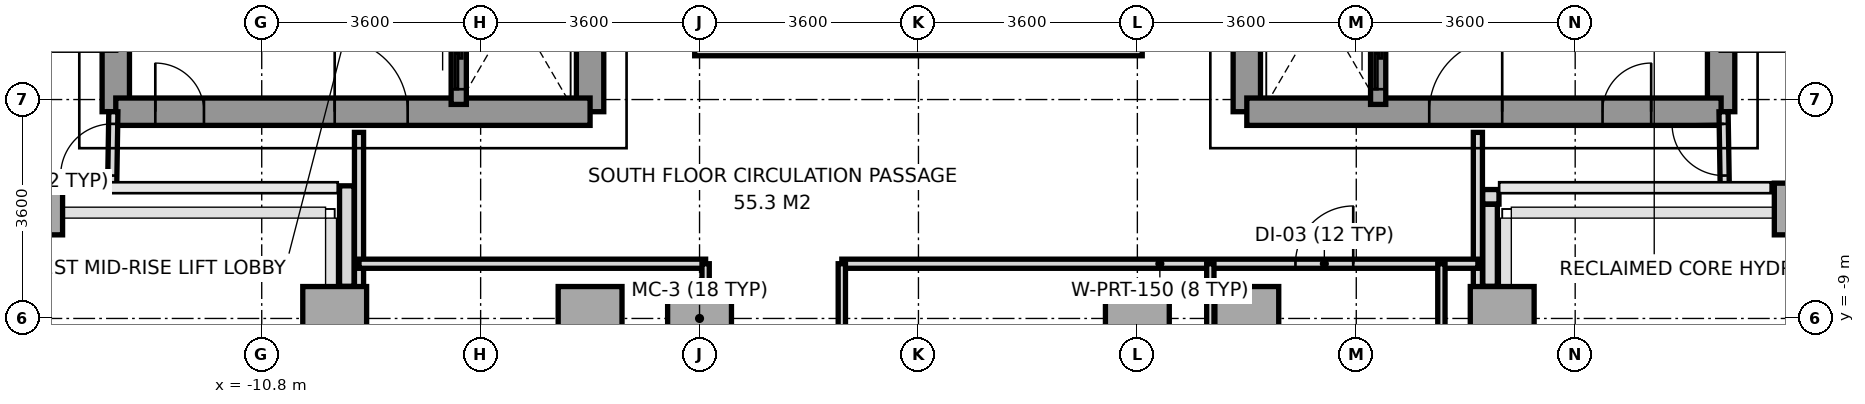
"""IFC4 building model, lengths in metres.
Left out: names, types, materials, properties, quantities, classifications, styles, units other than length and angle.
Written with IfcOpenShell. Run it as: python <this file> out.ifc"""

import sys

from ifc_helpers import new_model, si_unit, direction, frame, frame_2d, origin, origin_2d, place, context, subcontext, project, spatial, rectangle, extrude, source, transform, mapped, element, fill, save


model = new_model("IFC4")
c1 = context("Model", 3, precision=1e-05, world=origin(), true_north=direction((0.0, 1.0)))
c2 = subcontext(c1, "Body", "Model", "MODEL_VIEW")
j1 = project(units=[si_unit("LENGTHUNIT", "METRE"), si_unit("PLANEANGLEUNIT", "RADIAN")], contexts=[c1])
p1 = place(None, origin())
s1 = spatial("IfcSite", under=j1, at=p1, CompositionType="ELEMENT")
p2 = place(p1, origin())
s2 = spatial("IfcBuilding", under=s1, at=p2, CompositionType="ELEMENT")
p3 = place(p2, frame((0.0, 0.0, 114.2)))
s3 = spatial("IfcBuildingStorey", under=s2, at=p3, CompositionType="ELEMENT", Elevation=114.2)
m1 = source(origin(), c2, "Body", "SweptSolid", [
    extrude(rectangle(XDim=0.65, YDim=0.85, at=origin_2d()), origin(), (0.0, 0.0, 1.0), 3.2),
])
p4 = place(p3, frame((-14.4, -7.2, 0.0), z_axis=(0.0, 0.0, 1.0), x_axis=(1.0, 0.0, 0.0)))
e1 = element("IfcColumn", 1, at=p4, inside=s3, PredefinedType="COLUMN", context=c2, shape_type="MappedRepresentation", body=[
    mapped(m1, transform((0.0, 0.0, 0.0), x_axis=(1.0, 0.0, 0.0), y_axis=(0.0, 1.0, 0.0), z_axis=(0.0, 0.0, 1.0), scale=1.0)),
])
m2 = source(origin(), c2, "Body", "SweptSolid", [
    extrude(rectangle(XDim=1.05, YDim=1.05, at=origin_2d()), origin(), (0.0, 0.0, 1.0), 3.2),
])
for number, where, z_axis, x_axis in (
    (2, (-9.6, -9.0, 0.0), (0.0, 0.0, 1.0), (1.0, 0.0, 0.0)),
    (3, (-5.4, -9.0, 0.0), (0.0, 0.0, 1.0), (1.0, 0.0, 0.0)),
    (4, (-3.6, -9.0, 0.0), (0.0, 0.0, 1.0), (1.0, 0.0, 0.0)),
    (5, (3.6, -9.0, 0.0), (0.0, 0.0, 1.0), (1.0, 0.0, 0.0)),
    (6, (5.4, -9.0, 0.0), (0.0, 0.0, 1.0), (1.0, 0.0, 0.0)),
    (7, (9.6, -9.0, 0.0), (0.0, 0.0, 1.0), (1.0, 0.0, 0.0)),
):
    element("IfcColumn", number, at=place(p3, frame(where, z_axis=z_axis, x_axis=x_axis)), inside=s3, PredefinedType="COLUMN", context=c2, shape_type="MappedRepresentation", body=[
        mapped(m2, transform((0.0, 0.0, 0.0), x_axis=(1.0, 0.0, 0.0), y_axis=(0.0, 1.0, 0.0), z_axis=(0.0, 0.0, 1.0), scale=1.0)),
    ])
p5 = place(p3, frame((14.4, -7.2, 0.0), z_axis=(0.0, 0.0, 1.0), x_axis=(1.0, 0.0, 0.0)))
e8 = element("IfcColumn", 8, at=p5, inside=s3, PredefinedType="COLUMN", context=c2, shape_type="MappedRepresentation", body=[
    mapped(m1, transform((0.0, 0.0, 0.0), x_axis=(1.0, 0.0, 0.0), y_axis=(0.0, 1.0, 0.0), z_axis=(0.0, 0.0, 1.0), scale=1.0)),
])
p6 = place(p3, frame((9.547, -7.0, 0.0), z_axis=(0.0, 0.0, 1.0), x_axis=(-1.0, 0.0, 0.0)))
e9 = element("IfcWall", 9, at=p6, inside=s3, PredefinedType="PARAPET", context=c2, shape_type="SweptSolid", body=[
    extrude(rectangle(XDim=0.269, YDim=0.24, at=frame_2d((0.135, 0.0))), origin(), (0.0, 0.0, 1.0), 1.15),
])
p7 = place(p3, frame((9.4, -7.123, 0.0), z_axis=(0.0, 0.0, 1.0), x_axis=(0.0, -1.0, 0.0)))
e10 = element("IfcWall", 10, at=p7, inside=s3, PredefinedType="PARAPET", context=c2, shape_type="SweptSolid", body=[
    extrude(rectangle(XDim=1.349, YDim=0.24, at=frame_2d((0.674, 0.0))), origin(), (0.0, 0.0, 1.0), 1.15),
])
p8 = place(p3, frame((-9.4, -8.472, 0.0), z_axis=(0.0, 0.0, 1.0), x_axis=(0.0, 1.0, 0.0)))
e11 = element("IfcWall", 11, at=p8, inside=s3, PredefinedType="PARAPET", context=c2, shape_type="SweptSolid", body=[
    extrude(rectangle(XDim=1.653, YDim=0.24, at=frame_2d((0.827, 0.0))), origin(), (0.0, 0.0, 1.0), 1.15),
])
p9 = place(p3, frame((-13.2, -5.6, 0.0), z_axis=(0.0, 0.0, 1.0), x_axis=(0.0, 1.0, 0.0)))
e12 = element("IfcWall", 12, at=p9, inside=s3, PredefinedType="SHEAR", context=c2, shape_type="SweptSolid", body=[
    extrude(rectangle(XDim=11.2, YDim=0.45, at=frame_2d((5.6, 0.0))), origin(), (0.0, 0.0, 1.0), 3.2),
])
p10 = place(p3, frame((-5.4, -5.6, 0.0), z_axis=(0.0, 0.0, 1.0), x_axis=(0.0, 1.0, 0.0)))
e13 = element("IfcWall", 13, at=p10, inside=s3, PredefinedType="SHEAR", context=c2, shape_type="SweptSolid", body=[
    extrude(rectangle(XDim=12.5, YDim=0.45, at=frame_2d((6.25, 0.0))), origin(), (0.0, 0.0, 1.0), 3.2),
])
p11 = place(p10, frame((4.55, 0.0, 0.0)))
e14 = element("IfcOpeningElement", 14, at=p11, cuts=e13, PredefinedType="OPENING", context=c2, shape_type="SweptSolid", body=[
    extrude(rectangle(XDim=1.2, YDim=2.2, at=frame_2d((0.6, 1.1))), frame((0.0, 0.235, 0.0), z_axis=(0.0, -1.0, 0.0), x_axis=(1.0, 0.0, 0.0)), (0.0, 0.0, 1.0), 0.47),
])
p12 = place(p10, frame((6.86, 0.0, 0.0)))
e15 = element("IfcOpeningElement", 15, at=p12, cuts=e13, PredefinedType="OPENING", context=c2, shape_type="SweptSolid", body=[
    extrude(rectangle(XDim=0.8, YDim=2.1, at=frame_2d((0.4, 1.05))), frame((0.0, 0.235, 0.0), z_axis=(0.0, -1.0, 0.0), x_axis=(1.0, 0.0, 0.0)), (0.0, 0.0, 1.0), 0.47),
])
p13 = place(p10, frame((7.88, 0.0, 0.0)))
e16 = element("IfcOpeningElement", 16, at=p13, cuts=e13, PredefinedType="OPENING", context=c2, shape_type="SweptSolid", body=[
    extrude(rectangle(XDim=0.8, YDim=2.1, at=frame_2d((0.4, 1.05))), frame((0.0, 0.235, 0.0), z_axis=(0.0, -1.0, 0.0), x_axis=(1.0, 0.0, 0.0)), (0.0, 0.0, 1.0), 0.47),
])
p14 = place(p3, frame((-13.2, -5.6, 0.0), z_axis=(0.0, 0.0, 1.0), x_axis=(1.0, 0.0, 0.0)))
e17 = element("IfcWall", 17, at=p14, inside=s3, PredefinedType="SHEAR", context=c2, shape_type="SweptSolid", body=[
    extrude(rectangle(XDim=7.8, YDim=0.45, at=frame_2d((3.9, 0.0))), origin(), (0.0, 0.0, 1.0), 3.2),
])
p15 = place(p14, frame((3.6, 0.0, 0.0)))
e18 = element("IfcOpeningElement", 18, at=p15, cuts=e17, PredefinedType="OPENING", context=c2, shape_type="SweptSolid", body=[
    extrude(rectangle(XDim=1.2, YDim=2.2, at=frame_2d((0.6, 1.1))), frame((0.0, 0.235, 0.0), z_axis=(0.0, -1.0, 0.0), x_axis=(1.0, 0.0, 0.0)), (0.0, 0.0, 1.0), 0.47),
])
p16 = place(p14, frame((0.65, 0.0, 0.0)))
e19 = element("IfcOpeningElement", 19, at=p16, cuts=e17, PredefinedType="OPENING", context=c2, shape_type="SweptSolid", body=[
    extrude(rectangle(XDim=0.8, YDim=2.1, at=frame_2d((0.4, 1.05))), frame((0.0, 0.235, 0.0), z_axis=(0.0, -1.0, 0.0), x_axis=(1.0, 0.0, 0.0)), (0.0, 0.0, 1.0), 0.47),
])
p17 = place(p3, frame((13.2, -5.6, 0.0), z_axis=(0.0, 0.0, 1.0), x_axis=(0.0, 1.0, 0.0)))
e20 = element("IfcWall", 20, at=p17, inside=s3, PredefinedType="SHEAR", context=c2, shape_type="SweptSolid", body=[
    extrude(rectangle(XDim=11.2, YDim=0.45, at=frame_2d((5.6, 0.0))), origin(), (0.0, 0.0, 1.0), 3.2),
])
p18 = place(p3, frame((5.4, -5.6, 0.0), z_axis=(0.0, 0.0, 1.0), x_axis=(0.0, 1.0, 0.0)))
e21 = element("IfcWall", 21, at=p18, inside=s3, PredefinedType="SHEAR", context=c2, shape_type="SweptSolid", body=[
    extrude(rectangle(XDim=12.5, YDim=0.45, at=frame_2d((6.25, 0.0))), origin(), (0.0, 0.0, 1.0), 3.2),
])
p19 = place(p18, frame((4.55, 0.0, 0.0)))
e22 = element("IfcOpeningElement", 22, at=p19, cuts=e21, PredefinedType="OPENING", context=c2, shape_type="SweptSolid", body=[
    extrude(rectangle(XDim=1.2, YDim=2.2, at=frame_2d((0.6, 1.1))), frame((0.0, 0.235, 0.0), z_axis=(0.0, -1.0, 0.0), x_axis=(1.0, 0.0, 0.0)), (0.0, 0.0, 1.0), 0.47),
])
p20 = place(p3, frame((5.4, -5.6, 0.0), z_axis=(0.0, 0.0, 1.0), x_axis=(1.0, 0.0, 0.0)))
e23 = element("IfcWall", 23, at=p20, inside=s3, PredefinedType="SHEAR", context=c2, shape_type="SweptSolid", body=[
    extrude(rectangle(XDim=7.8, YDim=0.45, at=frame_2d((3.9, 0.0))), origin(), (0.0, 0.0, 1.0), 3.2),
])
p21 = place(p20, frame((3.0, 0.0, 0.0)))
e24 = element("IfcOpeningElement", 24, at=p21, cuts=e23, PredefinedType="OPENING", context=c2, shape_type="SweptSolid", body=[
    extrude(rectangle(XDim=1.2, YDim=2.2, at=frame_2d((0.6, 1.1))), frame((0.0, 0.235, 0.0), z_axis=(0.0, -1.0, 0.0), x_axis=(1.0, 0.0, 0.0)), (0.0, 0.0, 1.0), 0.47),
])
p22 = place(p20, frame((5.85, 0.0, 0.0)))
e25 = element("IfcOpeningElement", 25, at=p22, cuts=e23, PredefinedType="OPENING", context=c2, shape_type="SweptSolid", body=[
    extrude(rectangle(XDim=0.8, YDim=2.1, at=frame_2d((0.4, 1.05))), frame((0.0, 0.235, 0.0), z_axis=(0.0, -1.0, 0.0), x_axis=(1.0, 0.0, 0.0)), (0.0, 0.0, 1.0), 0.47),
])
p23 = place(p3, frame((-7.56, -5.48, 0.0), z_axis=(0.0, 0.0, 1.0), x_axis=(0.0, 1.0, 0.0)))
e26 = element("IfcWall", 26, at=p23, inside=s3, PredefinedType="SOLIDWALL", context=c2, shape_type="SweptSolid", body=[
    extrude(rectangle(XDim=1.6, YDim=0.25, at=frame_2d((0.8, 0.0))), origin(), (0.0, 0.0, 1.0), 3.2),
])
p24 = place(p23, frame((0.25, 0.0, 0.0)))
e27 = element("IfcOpeningElement", 27, at=p24, cuts=e26, PredefinedType="OPENING", context=c2, shape_type="SweptSolid", body=[
    extrude(rectangle(XDim=1.1, YDim=2.2, at=frame_2d((0.55, 1.1))), frame((0.0, 0.135, 0.0), z_axis=(0.0, -1.0, 0.0), x_axis=(1.0, 0.0, 0.0)), (0.0, 0.0, 1.0), 0.27),
])
p25 = place(p3, frame((7.56, -5.48, 0.0), z_axis=(0.0, 0.0, 1.0), x_axis=(0.0, 1.0, 0.0)))
e28 = element("IfcWall", 28, at=p25, inside=s3, PredefinedType="SOLIDWALL", context=c2, shape_type="SweptSolid", body=[
    extrude(rectangle(XDim=1.6, YDim=0.25, at=frame_2d((0.8, 0.0))), origin(), (0.0, 0.0, 1.0), 3.2),
])
p26 = place(p25, frame((0.25, 0.0, 0.0)))
e29 = element("IfcOpeningElement", 29, at=p26, cuts=e28, PredefinedType="OPENING", context=c2, shape_type="SweptSolid", body=[
    extrude(rectangle(XDim=1.1, YDim=2.2, at=frame_2d((0.55, 1.1))), frame((0.0, 0.135, 0.0), z_axis=(0.0, -1.0, 0.0), x_axis=(1.0, 0.0, 0.0)), (0.0, 0.0, 1.0), 0.27),
])
for number, where, z_axis, x_axis in (
    (30, (-9.2, -15.68, 0.0), (0.0, 0.0, 1.0), (0.0, 1.0, 0.0)),
    (31, (9.2, -15.68, 0.0), (0.0, 0.0, 1.0), (0.0, 1.0, 0.0)),
):
    element("IfcWall", number, at=place(p3, frame(where, z_axis=z_axis, x_axis=x_axis)), inside=s3, PredefinedType="PARTITIONING", context=c2, shape_type="SweptSolid", body=[
        extrude(rectangle(XDim=9.74, YDim=0.15, at=frame_2d((4.87, 0.0))), origin(), (0.0, 0.0, 1.0), 2.7),
    ])
p27 = place(p3, frame((-9.2, -8.1, 0.0), z_axis=(0.0, 0.0, 1.0), x_axis=(1.0, 0.0, 0.0)))
e32 = element("IfcWall", 32, at=p27, inside=s3, PredefinedType="PARTITIONING", context=c2, shape_type="SweptSolid", body=[
    extrude(rectangle(XDim=5.7, YDim=0.15, at=frame_2d((2.85, 0.0))), origin(), (0.0, 0.0, 1.0), 2.75),
])
p28 = place(p3, frame((-1.26, -8.1, 0.0), z_axis=(0.0, 0.0, 1.0), x_axis=(1.0, 0.0, 0.0)))
e33 = element("IfcWall", 33, at=p28, inside=s3, PredefinedType="PARTITIONING", context=c2, shape_type="SweptSolid", body=[
    extrude(rectangle(XDim=10.46, YDim=0.15, at=frame_2d((5.23, 0.0))), origin(), (0.0, 0.0, 1.0), 2.75),
])
p29 = place(p28, frame((7.46, 0.0, 0.0)))
e34 = element("IfcOpeningElement", 34, at=p29, cuts=e33, PredefinedType="OPENING", context=c2, shape_type="SweptSolid", body=[
    extrude(rectangle(XDim=0.95, YDim=2.15, at=frame_2d((0.475, 1.075))), frame((0.0, 0.085, 0.0), z_axis=(0.0, -1.0, 0.0), x_axis=(1.0, 0.0, 0.0)), (0.0, 0.0, 1.0), 0.17),
])
p30 = place(p3, frame((-3.5, -18.1, 0.0), z_axis=(0.0, 0.0, 1.0), x_axis=(0.0, 1.0, 0.0)))
e35 = element("IfcWall", 35, at=p30, inside=s3, PredefinedType="PARTITIONING", context=c2, shape_type="SweptSolid", body=[
    extrude(rectangle(XDim=10.0, YDim=0.12, at=frame_2d((5.0, 0.0))), origin(), (0.0, 0.0, 1.0), 2.7),
])
p31 = place(p30, frame((5.9, 0.0, 0.0)))
e36 = element("IfcOpeningElement", 36, at=p31, cuts=e35, PredefinedType="OPENING", context=c2, shape_type="SweptSolid", body=[
    extrude(rectangle(XDim=0.95, YDim=2.15, at=frame_2d((0.475, 1.075))), frame((0.0, 0.07, 0.0), z_axis=(0.0, -1.0, 0.0), x_axis=(1.0, 0.0, 0.0)), (0.0, 0.0, 1.0), 0.14),
])
p32 = place(p30, frame((1.2, 0.0, 0.0)))
e37 = element("IfcOpeningElement", 37, at=p32, cuts=e35, PredefinedType="OPENING", context=c2, shape_type="SweptSolid", body=[
    extrude(rectangle(XDim=0.95, YDim=2.15, at=frame_2d((0.475, 1.075))), frame((0.0, 0.07, 0.0), z_axis=(0.0, -1.0, 0.0), x_axis=(1.0, 0.0, 0.0)), (0.0, 0.0, 1.0), 0.14),
])
p33 = place(p3, frame((-1.26, -18.1, 0.0), z_axis=(0.0, 0.0, 1.0), x_axis=(0.0, 1.0, 0.0)))
e38 = element("IfcWall", 38, at=p33, inside=s3, PredefinedType="PARTITIONING", context=c2, shape_type="SweptSolid", body=[
    extrude(rectangle(XDim=10.0, YDim=0.12, at=frame_2d((5.0, 0.0))), origin(), (0.0, 0.0, 1.0), 2.7),
])
p34 = place(p33, frame((1.6, 0.0, 0.0)))
e39 = element("IfcOpeningElement", 39, at=p34, cuts=e38, PredefinedType="OPENING", context=c2, shape_type="SweptSolid", body=[
    extrude(rectangle(XDim=1.1, YDim=2.2, at=frame_2d((0.55, 1.1))), frame((0.0, 0.07, 0.0), z_axis=(0.0, -1.0, 0.0), x_axis=(1.0, 0.0, 0.0)), (0.0, 0.0, 1.0), 0.14),
])
p35 = place(p3, frame((4.8, -11.5, 0.0), z_axis=(0.0, 0.0, 1.0), x_axis=(0.0, 1.0, 0.0)))
e40 = element("IfcWall", 40, at=p35, inside=s3, PredefinedType="PARTITIONING", context=c2, shape_type="SweptSolid", body=[
    extrude(rectangle(XDim=3.4, YDim=0.12, at=frame_2d((1.7, 0.0))), origin(), (0.0, 0.0, 1.0), 3.2),
])
p36 = place(p3, frame((8.6, -11.5, 0.0), z_axis=(0.0, 0.0, 1.0), x_axis=(0.0, 1.0, 0.0)))
e41 = element("IfcWall", 41, at=p36, inside=s3, PredefinedType="PARTITIONING", context=c2, shape_type="SweptSolid", body=[
    extrude(rectangle(XDim=3.4, YDim=0.12, at=frame_2d((1.7, 0.0))), origin(), (0.0, 0.0, 1.0), 2.7),
])
p37 = place(p3, frame((-13.26, -6.85, 0.0), z_axis=(0.0, 0.0, 1.0), x_axis=(0.016013571389, 0.999871774545, 0.0)))
e42 = element("IfcWall", 42, at=p37, inside=s3, PredefinedType="PARTITIONING", context=c2, shape_type="SweptSolid", body=[
    extrude(rectangle(XDim=1.25, YDim=0.15, at=frame_2d((0.625, 0.0))), origin(), (0.0, 0.0, 1.0), 3.2),
])
p38 = place(p37, frame((0.2, 0.0, 0.0)))
e43 = element("IfcOpeningElement", 43, at=p38, cuts=e42, PredefinedType="OPENING", context=c2, shape_type="SweptSolid", body=[
    extrude(rectangle(XDim=0.85, YDim=2.1, at=frame_2d((0.425, 1.05))), frame((0.0, 0.085, 0.0), z_axis=(0.0, -1.0, 0.0), x_axis=(1.0, 0.0, 0.0)), (0.0, 0.0, 1.0), 0.17),
])
p39 = place(p3, frame((13.26, -6.85, 0.0), z_axis=(0.0, 0.0, 1.0), x_axis=(-0.016013571389, 0.999871774545, 0.0)))
e44 = element("IfcWall", 44, at=p39, inside=s3, PredefinedType="PARTITIONING", context=c2, shape_type="SweptSolid", body=[
    extrude(rectangle(XDim=1.25, YDim=0.15, at=frame_2d((0.625, 0.0))), origin(), (0.0, 0.0, 1.0), 3.2),
])
p40 = place(p39, frame((0.2, 0.0, 0.0)))
e45 = element("IfcOpeningElement", 45, at=p40, cuts=e44, PredefinedType="OPENING", context=c2, shape_type="SweptSolid", body=[
    extrude(rectangle(XDim=0.85, YDim=2.1, at=frame_2d((0.425, 1.05))), frame((0.0, 0.085, 0.0), z_axis=(0.0, -1.0, 0.0), x_axis=(1.0, 0.0, 0.0)), (0.0, 0.0, 1.0), 0.17),
])
p41 = place(p3, frame((-3.68, -4.56, 0.0), z_axis=(0.0, 0.0, 1.0), x_axis=(1.0, 0.0, 0.0)))
e46 = element("IfcWall", 46, at=p41, inside=s3, PredefinedType="PARAPET", context=c2, shape_type="SweptSolid", body=[
    extrude(rectangle(XDim=7.36, YDim=0.24, at=frame_2d((3.68, 0.0))), origin(), (0.0, 0.0, 1.0), 1.15),
])
m3 = source(origin(), c2, "Body", "SweptSolid", [
    extrude(rectangle(XDim=1.2, YDim=2.2, at=frame_2d((0.6, 1.1))), frame((0.0, 0.025, 0.0), z_axis=(0.0, -1.0, 0.0), x_axis=(1.0, 0.0, 0.0)), (0.0, 0.0, 1.0), 0.05),
])
p42 = place(p15, origin())
e47 = element("IfcDoor", 47, at=p42, inside=s3, OperationType="SINGLE_SWING_LEFT", PredefinedType="DOOR", context=c2, shape_type="MappedRepresentation", body=[
    mapped(m3, transform((0.0, 0.0, 0.0), x_axis=(1.0, 0.0, 0.0), y_axis=(0.0, 1.0, 0.0), z_axis=(0.0, 0.0, 1.0), scale=1.0)),
])
fill(e18, e47)
p43 = place(p21, origin())
e48 = element("IfcDoor", 48, at=p43, inside=s3, OperationType="SINGLE_SWING_RIGHT", PredefinedType="DOOR", context=c2, shape_type="MappedRepresentation", body=[
    mapped(m3, transform((0.0, 0.0, 0.0), x_axis=(1.0, 0.0, 0.0), y_axis=(0.0, 1.0, 0.0), z_axis=(0.0, 0.0, 1.0), scale=1.0)),
])
fill(e24, e48)
m4 = source(origin(), c2, "Body", "SweptSolid", [
    extrude(rectangle(XDim=0.8, YDim=2.1, at=frame_2d((0.4, 1.05))), frame((0.0, 0.025, 0.0), z_axis=(0.0, -1.0, 0.0), x_axis=(1.0, 0.0, 0.0)), (0.0, 0.0, 1.0), 0.05),
])
p44 = place(p16, origin())
e49 = element("IfcDoor", 49, at=p44, inside=s3, OperationType="SINGLE_SWING_LEFT", PredefinedType="DOOR", context=c2, shape_type="MappedRepresentation", body=[
    mapped(m4, transform((0.0, 0.0, 0.0), x_axis=(1.0, 0.0, 0.0), y_axis=(0.0, 1.0, 0.0), z_axis=(0.0, 0.0, 1.0), scale=1.0)),
])
fill(e19, e49)
p45 = place(p22, origin())
e50 = element("IfcDoor", 50, at=p45, inside=s3, OperationType="SINGLE_SWING_RIGHT", PredefinedType="DOOR", context=c2, shape_type="MappedRepresentation", body=[
    mapped(m4, transform((0.0, 0.0, 0.0), x_axis=(1.0, 0.0, 0.0), y_axis=(0.0, 1.0, 0.0), z_axis=(0.0, 0.0, 1.0), scale=1.0)),
])
fill(e25, e50)
m5 = source(origin(), c2, "Body", "SweptSolid", [
    extrude(rectangle(XDim=1.1, YDim=2.2, at=frame_2d((0.55, 1.1))), frame((0.0, 0.025, 0.0), z_axis=(0.0, -1.0, 0.0), x_axis=(1.0, 0.0, 0.0)), (0.0, 0.0, 1.0), 0.05),
])
p46 = place(p24, origin())
e51 = element("IfcDoor", 51, at=p46, inside=s3, OperationType="SLIDING_TO_LEFT", PredefinedType="DOOR", context=c2, shape_type="MappedRepresentation", body=[
    mapped(m5, transform((0.0, 0.0, 0.0), x_axis=(1.0, 0.0, 0.0), y_axis=(0.0, 1.0, 0.0), z_axis=(0.0, 0.0, 1.0), scale=1.0)),
])
fill(e27, e51)
p47 = place(p26, origin())
e52 = element("IfcDoor", 52, at=p47, inside=s3, OperationType="SLIDING_TO_LEFT", PredefinedType="DOOR", context=c2, shape_type="MappedRepresentation", body=[
    mapped(m5, transform((0.0, 0.0, 0.0), x_axis=(1.0, 0.0, 0.0), y_axis=(0.0, 1.0, 0.0), z_axis=(0.0, 0.0, 1.0), scale=1.0)),
])
fill(e29, e52)
m6 = source(origin(), c2, "Body", "SweptSolid", [
    extrude(rectangle(XDim=0.95, YDim=2.15, at=frame_2d((0.475, 1.075))), frame((0.0, 0.025, 0.0), z_axis=(0.0, -1.0, 0.0), x_axis=(1.0, 0.0, 0.0)), (0.0, 0.0, 1.0), 0.05),
])
p48 = place(p29, origin())
e53 = element("IfcDoor", 53, at=p48, inside=s3, OperationType="SINGLE_SWING_RIGHT", PredefinedType="DOOR", context=c2, shape_type="MappedRepresentation", body=[
    mapped(m6, transform((0.0, 0.0, 0.0), x_axis=(1.0, 0.0, 0.0), y_axis=(0.0, 1.0, 0.0), z_axis=(0.0, 0.0, 1.0), scale=1.0)),
])
fill(e34, e53)
m7 = source(origin(), c2, "Body", "SweptSolid", [
    extrude(rectangle(XDim=0.85, YDim=2.1, at=frame_2d((0.425, 1.05))), frame((0.0, 0.025, 0.0), z_axis=(0.0, -1.0, 0.0), x_axis=(1.0, 0.0, 0.0)), (0.0, 0.0, 1.0), 0.05),
])
p49 = place(p38, origin())
e54 = element("IfcDoor", 54, at=p49, inside=s3, OperationType="SINGLE_SWING_LEFT", PredefinedType="DOOR", context=c2, shape_type="MappedRepresentation", body=[
    mapped(m7, transform((0.0, 0.0, 0.0), x_axis=(1.0, 0.0, 0.0), y_axis=(0.0, 1.0, 0.0), z_axis=(0.0, 0.0, 1.0), scale=1.0)),
])
fill(e43, e54)
p50 = place(p40, origin())
e55 = element("IfcDoor", 55, at=p50, inside=s3, OperationType="SINGLE_SWING_RIGHT", PredefinedType="DOOR", context=c2, shape_type="MappedRepresentation", body=[
    mapped(m7, transform((0.0, 0.0, 0.0), x_axis=(1.0, 0.0, 0.0), y_axis=(0.0, 1.0, 0.0), z_axis=(0.0, 0.0, 1.0), scale=1.0)),
])
fill(e45, e55)
save(model, sys.argv[1])
